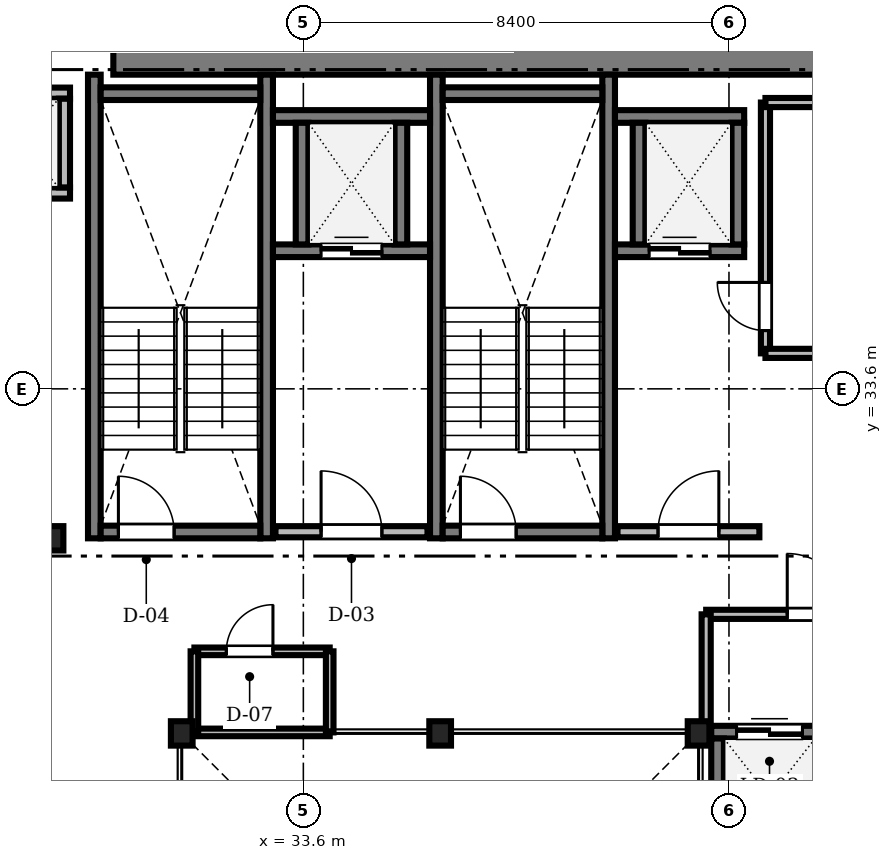
"""IFC4 building model, lengths in metres.
Left out: names, types, materials, properties, quantities, classifications, styles, units other than length and angle.
Written with IfcOpenShell. Run it as: python <this file> out.ifc"""

import sys

from ifc_helpers import new_model, si_unit, direction, frame, frame_2d, origin, origin_2d, place, context, subcontext, project, spatial, rectangle, i_section, extrude, source, transform, mapped, element, fill, save


model = new_model("IFC4")
c1 = context("Model", 3, precision=1e-05, world=origin(), true_north=direction((0.0, 1.0)))
c2 = subcontext(c1, "Body", "Model", "MODEL_VIEW")
j1 = project(units=[si_unit("LENGTHUNIT", "METRE"), si_unit("PLANEANGLEUNIT", "RADIAN")], contexts=[c1])
p1 = place(None, origin())
s1 = spatial("IfcSite", under=j1, at=p1, CompositionType="ELEMENT")
p2 = place(p1, origin())
s2 = spatial("IfcBuilding", under=s1, at=p2, CompositionType="ELEMENT")
p3 = place(p2, frame((0.0, 0.0, 75.05)))
s3 = spatial("IfcBuildingStorey", under=s2, at=p3, CompositionType="ELEMENT", Elevation=75.05)
m1 = source(origin(), c2, "Body", "SweptSolid", [
    extrude(rectangle(XDim=17.52, YDim=1.0, at=frame_2d((8.76, 0.0))), origin(), (0.0, 0.0, 1.0), 3.41),
])
p4 = place(p3, frame((29.85, 40.3, 0.0), z_axis=(0.0, 0.0, 1.0), x_axis=(1.0, 0.0, 0.0)))
e1 = element("IfcWall", 1, at=p4, inside=s3, PredefinedType="SHEAR", context=c2, shape_type="MappedRepresentation", body=[
    mapped(m1, transform((0.0, 0.0, 0.0), scale=1.0)),
])
m2 = source(origin(), c2, "Body", "SweptSolid", [
    extrude(i_section(OverallWidth=0.428, OverallDepth=0.481, WebThickness=0.04, FlangeThickness=0.063, FilletRadius=0.015, at=origin_2d()), origin(), (0.0, 0.0, 1.0), 3.41),
])
for number, where, z_axis, x_axis in (
    (2, (41.4, 26.8, 0.0), (0.0, 0.0, 1.0), (1.0, 0.0, 0.0)),
    (3, (36.3, 26.8, 0.0), (0.0, 0.0, 1.0), (1.0, 0.0, 0.0)),
    (4, (31.2, 26.8, 0.0), (0.0, 0.0, 1.0), (1.0, 0.0, 0.0)),
    (5, (28.65, 30.65, 0.0), (0.0, 0.0, 1.0), (1.0, 0.0, 0.0)),
):
    element("IfcColumn", number, at=place(p3, frame(where, z_axis=z_axis, x_axis=x_axis)), inside=s3, PredefinedType="COLUMN", context=c2, shape_type="MappedRepresentation", body=[
        mapped(m2, transform((0.0, 0.0, 0.0), scale=1.0)),
    ])
m3 = source(origin(), c2, "Body", "SweptSolid", [
    extrude(rectangle(XDim=9.15, YDim=0.25, at=frame_2d((4.575, 0.0))), origin(), (0.0, 0.0, 1.0), 3.45),
])
for number, where, z_axis, x_axis in (
    (6, (29.475, 30.65, 0.0), (0.0, 0.0, 1.0), (0.0, 1.0, 0.0)),
    (7, (32.875, 30.65, 0.0), (0.0, 0.0, 1.0), (0.0, 1.0, 0.0)),
):
    element("IfcWall", number, at=place(p3, frame(where, z_axis=z_axis, x_axis=x_axis)), inside=s3, PredefinedType="SOLIDWALL", context=c2, shape_type="MappedRepresentation", body=[
        mapped(m3, transform((0.0, 0.0, 0.0), scale=1.0)),
    ])
m4 = source(origin(), c2, "Body", "SweptSolid", [
    extrude(rectangle(XDim=3.15, YDim=0.25, at=frame_2d((1.575, 0.0))), origin(), (0.0, 0.0, 1.0), 3.45),
])
p5 = place(p3, frame((29.6, 39.425, 0.0), z_axis=(0.0, 0.0, 1.0), x_axis=(1.0, 0.0, 0.0)))
e8 = element("IfcWall", 8, at=p5, inside=s3, PredefinedType="SOLIDWALL", context=c2, shape_type="MappedRepresentation", body=[
    mapped(m4, transform((0.0, 0.0, 0.0), scale=1.0)),
])
p6 = place(p3, frame((29.6, 30.775, 0.0), z_axis=(0.0, 0.0, 1.0), x_axis=(1.0, 0.0, 0.0)))
e9 = element("IfcWall", 9, at=p6, inside=s3, PredefinedType="SOLIDWALL", context=c2, shape_type="MappedRepresentation", body=[
    mapped(m4, transform((0.0, 0.0, 0.0), scale=1.0)),
])
m5 = source(origin(), c2, "Body", "SweptSolid", [
    extrude(rectangle(XDim=1.1, YDim=2.2, at=frame_2d((0.55, 1.1))), frame((0.0, 0.135, 0.0), z_axis=(0.0, -1.0, 0.0), x_axis=(1.0, 0.0, 0.0)), (0.0, 0.0, 1.0), 0.27),
])
p7 = place(p6, frame((0.35, 0.0, 0.0)))
e10 = element("IfcOpeningElement", 10, at=p7, cuts=e9, PredefinedType="OPENING", context=c2, shape_type="MappedRepresentation", body=[
    mapped(m5, transform((0.0, 0.0, 0.0), scale=1.0)),
])
for number, where, z_axis, x_axis in (
    (11, (36.225, 30.65, 0.0), (0.0, 0.0, 1.0), (0.0, 1.0, 0.0)),
    (12, (39.625, 30.65, 0.0), (0.0, 0.0, 1.0), (0.0, 1.0, 0.0)),
):
    element("IfcWall", number, at=place(p3, frame(where, z_axis=z_axis, x_axis=x_axis)), inside=s3, PredefinedType="SOLIDWALL", context=c2, shape_type="MappedRepresentation", body=[
        mapped(m3, transform((0.0, 0.0, 0.0), scale=1.0)),
    ])
p8 = place(p3, frame((36.35, 39.425, 0.0), z_axis=(0.0, 0.0, 1.0), x_axis=(1.0, 0.0, 0.0)))
e13 = element("IfcWall", 13, at=p8, inside=s3, PredefinedType="SOLIDWALL", context=c2, shape_type="MappedRepresentation", body=[
    mapped(m4, transform((0.0, 0.0, 0.0), scale=1.0)),
])
p9 = place(p3, frame((36.35, 30.775, 0.0), z_axis=(0.0, 0.0, 1.0), x_axis=(1.0, 0.0, 0.0)))
e14 = element("IfcWall", 14, at=p9, inside=s3, PredefinedType="SOLIDWALL", context=c2, shape_type="MappedRepresentation", body=[
    mapped(m4, transform((0.0, 0.0, 0.0), scale=1.0)),
])
p10 = place(p9, frame((0.35, 0.0, 0.0)))
e15 = element("IfcOpeningElement", 15, at=p10, cuts=e14, PredefinedType="OPENING", context=c2, shape_type="MappedRepresentation", body=[
    mapped(m5, transform((0.0, 0.0, 0.0), scale=1.0)),
])
m6 = source(origin(), c2, "Body", "SweptSolid", [
    extrude(rectangle(XDim=3.0, YDim=0.22, at=frame_2d((1.5, 0.0))), origin(), (0.0, 0.0, 1.0), 3.41),
])
p11 = place(p3, frame((33.05, 30.78, 0.0), z_axis=(0.0, 0.0, 1.0), x_axis=(1.0, 0.0, 0.0)))
e16 = element("IfcWall", 16, at=p11, inside=s3, PredefinedType="SOLIDWALL", context=c2, shape_type="MappedRepresentation", body=[
    mapped(m6, transform((0.0, 0.0, 0.0), scale=1.0)),
])
m7 = source(origin(), c2, "Body", "SweptSolid", [
    extrude(rectangle(XDim=1.2, YDim=2.2, at=frame_2d((0.6, 1.1))), frame((0.0, 0.12, 0.0), z_axis=(0.0, -1.0, 0.0), x_axis=(1.0, 0.0, 0.0)), (0.0, 0.0, 1.0), 0.24),
])
p12 = place(p11, frame((0.9, 0.0, 0.0)))
e17 = element("IfcOpeningElement", 17, at=p12, cuts=e16, PredefinedType="OPENING", context=c2, shape_type="MappedRepresentation", body=[
    mapped(m7, transform((0.0, 0.0, 0.0), scale=1.0)),
])
m8 = source(origin(), c2, "Body", "SweptSolid", [
    extrude(rectangle(XDim=2.8, YDim=0.22, at=frame_2d((1.4, 0.0))), origin(), (0.0, 0.0, 1.0), 3.41),
])
p13 = place(p3, frame((39.8, 30.78, 0.0), z_axis=(0.0, 0.0, 1.0), x_axis=(1.0, 0.0, 0.0)))
e18 = element("IfcWall", 18, at=p13, inside=s3, PredefinedType="SOLIDWALL", context=c2, shape_type="MappedRepresentation", body=[
    mapped(m8, transform((0.0, 0.0, 0.0), scale=1.0)),
])
p14 = place(p13, frame((0.8, 0.0, 0.0)))
e19 = element("IfcOpeningElement", 19, at=p14, cuts=e18, PredefinedType="OPENING", context=c2, shape_type="MappedRepresentation", body=[
    mapped(m7, transform((0.0, 0.0, 0.0), scale=1.0)),
])
m9 = source(origin(), c2, "Body", "SweptSolid", [
    extrude(rectangle(XDim=1.99, YDim=0.22, at=frame_2d((0.995, 0.0))), origin(), (0.0, 0.0, 1.0), 3.41),
])
p15 = place(p3, frame((27.005, 37.465, 0.0), z_axis=(0.0, 0.0, 1.0), x_axis=(1.0, 0.0, 0.0)))
e20 = element("IfcWall", 20, at=p15, inside=s3, PredefinedType="SOLIDWALL", context=c2, shape_type="MappedRepresentation", body=[
    mapped(m9, transform((0.0, 0.0, 0.0), scale=1.0)),
])
m10 = source(origin(), c2, "Body", "SweptSolid", [
    extrude(rectangle(XDim=1.1, YDim=2.2, at=frame_2d((0.55, 1.1))), frame((0.0, 0.12, 0.0), z_axis=(0.0, -1.0, 0.0), x_axis=(1.0, 0.0, 0.0)), (0.0, 0.0, 1.0), 0.24),
])
p16 = place(p15, frame((0.445, 0.0, 0.0)))
e21 = element("IfcOpeningElement", 21, at=p16, cuts=e20, PredefinedType="OPENING", context=c2, shape_type="MappedRepresentation", body=[
    mapped(m10, transform((0.0, 0.0, 0.0), scale=1.0)),
])
p17 = place(p3, frame((27.005, 39.435, 0.0), z_axis=(0.0, 0.0, 1.0), x_axis=(1.0, 0.0, 0.0)))
e22 = element("IfcWall", 22, at=p17, inside=s3, PredefinedType="SOLIDWALL", context=c2, shape_type="MappedRepresentation", body=[
    mapped(m9, transform((0.0, 0.0, 0.0), scale=1.0)),
])
m11 = source(origin(), c2, "Body", "SweptSolid", [
    extrude(rectangle(XDim=1.75, YDim=0.22, at=frame_2d((0.875, 0.0))), origin(), (0.0, 0.0, 1.0), 3.41),
])
p18 = place(p3, frame((28.885, 37.575, 0.0), z_axis=(0.0, 0.0, 1.0), x_axis=(0.0, 1.0, 0.0)))
e23 = element("IfcWall", 23, at=p18, inside=s3, PredefinedType="SOLIDWALL", context=c2, shape_type="MappedRepresentation", body=[
    mapped(m11, transform((0.0, 0.0, 0.0), scale=1.0)),
])
m12 = source(origin(), c2, "Body", "SweptSolid", [
    extrude(rectangle(XDim=3.1, YDim=0.25, at=frame_2d((1.55, 0.0))), origin(), (0.0, 0.0, 1.0), 3.41),
])
p19 = place(p3, frame((33.0, 36.325, 0.0), z_axis=(0.0, 0.0, 1.0), x_axis=(1.0, 0.0, 0.0)))
e24 = element("IfcWall", 24, at=p19, inside=s3, PredefinedType="SOLIDWALL", context=c2, shape_type="MappedRepresentation", body=[
    mapped(m12, transform((0.0, 0.0, 0.0), scale=1.0)),
])
m13 = source(origin(), c2, "Body", "SweptSolid", [
    extrude(rectangle(XDim=1.2, YDim=2.25, at=frame_2d((0.6, 1.125))), frame((0.0, 0.135, 0.0), z_axis=(0.0, -1.0, 0.0), x_axis=(1.0, 0.0, 0.0)), (0.0, 0.0, 1.0), 0.27),
])
p20 = place(p19, frame((0.95, 0.0, 0.0)))
e25 = element("IfcOpeningElement", 25, at=p20, cuts=e24, PredefinedType="OPENING", context=c2, shape_type="MappedRepresentation", body=[
    mapped(m13, transform((0.0, 0.0, 0.0), scale=1.0)),
])
p21 = place(p3, frame((33.0, 38.975, 0.0), z_axis=(0.0, 0.0, 1.0), x_axis=(1.0, 0.0, 0.0)))
e26 = element("IfcWall", 26, at=p21, inside=s3, PredefinedType="SOLIDWALL", context=c2, shape_type="MappedRepresentation", body=[
    mapped(m12, transform((0.0, 0.0, 0.0), scale=1.0)),
])
m14 = source(origin(), c2, "Body", "SweptSolid", [
    extrude(rectangle(XDim=2.4, YDim=0.25, at=frame_2d((1.2, 0.0))), origin(), (0.0, 0.0, 1.0), 3.41),
])
for number, where, z_axis, x_axis in (
    (27, (33.575, 36.45, 0.0), (0.0, 0.0, 1.0), (0.0, 1.0, 0.0)),
    (28, (35.525, 36.45, 0.0), (0.0, 0.0, 1.0), (0.0, 1.0, 0.0)),
):
    element("IfcWall", number, at=place(p3, frame(where, z_axis=z_axis, x_axis=x_axis)), inside=s3, PredefinedType="SOLIDWALL", context=c2, shape_type="MappedRepresentation", body=[
        mapped(m14, transform((0.0, 0.0, 0.0), scale=1.0)),
    ])
m15 = source(origin(), c2, "Body", "SweptSolid", [
    extrude(rectangle(XDim=2.55, YDim=0.25, at=frame_2d((1.275, 0.0))), origin(), (0.0, 0.0, 1.0), 3.41),
])
p22 = place(p3, frame((39.75, 36.325, 0.0), z_axis=(0.0, 0.0, 1.0), x_axis=(1.0, 0.0, 0.0)))
e29 = element("IfcWall", 29, at=p22, inside=s3, PredefinedType="SOLIDWALL", context=c2, shape_type="MappedRepresentation", body=[
    mapped(m15, transform((0.0, 0.0, 0.0), scale=1.0)),
])
p23 = place(p22, frame((0.675, 0.0, 0.0)))
e30 = element("IfcOpeningElement", 30, at=p23, cuts=e29, PredefinedType="OPENING", context=c2, shape_type="MappedRepresentation", body=[
    mapped(m13, transform((0.0, 0.0, 0.0), scale=1.0)),
])
p24 = place(p3, frame((39.75, 38.975, 0.0), z_axis=(0.0, 0.0, 1.0), x_axis=(1.0, 0.0, 0.0)))
e31 = element("IfcWall", 31, at=p24, inside=s3, PredefinedType="SOLIDWALL", context=c2, shape_type="MappedRepresentation", body=[
    mapped(m15, transform((0.0, 0.0, 0.0), scale=1.0)),
])
for number, where, z_axis, x_axis in (
    (32, (40.225, 36.45, 0.0), (0.0, 0.0, 1.0), (0.0, 1.0, 0.0)),
    (33, (42.175, 36.45, 0.0), (0.0, 0.0, 1.0), (0.0, 1.0, 0.0)),
):
    element("IfcWall", number, at=place(p3, frame(where, z_axis=z_axis, x_axis=x_axis)), inside=s3, PredefinedType="SOLIDWALL", context=c2, shape_type="MappedRepresentation", body=[
        mapped(m14, transform((0.0, 0.0, 0.0), scale=1.0)),
    ])
m16 = source(origin(), c2, "Body", "SweptSolid", [
    extrude(rectangle(XDim=2.3, YDim=0.25, at=frame_2d((1.15, 0.0))), origin(), (0.0, 0.0, 1.0), 3.41),
])
p25 = place(p3, frame((41.65, 26.825, 0.0), z_axis=(0.0, 0.0, 1.0), x_axis=(1.0, 0.0, 0.0)))
e34 = element("IfcWall", 34, at=p25, inside=s3, PredefinedType="SOLIDWALL", context=c2, shape_type="MappedRepresentation", body=[
    mapped(m16, transform((0.0, 0.0, 0.0), scale=1.0)),
])
m17 = source(origin(), c2, "Body", "SweptSolid", [
    extrude(rectangle(XDim=1.3, YDim=2.3, at=frame_2d((0.65, 1.15))), frame((0.0, 0.135, 0.0), z_axis=(0.0, -1.0, 0.0), x_axis=(1.0, 0.0, 0.0)), (0.0, 0.0, 1.0), 0.27),
])
p26 = place(p25, frame((0.5, 0.0, 0.0)))
e35 = element("IfcOpeningElement", 35, at=p26, cuts=e34, PredefinedType="OPENING", context=c2, shape_type="MappedRepresentation", body=[
    mapped(m17, transform((0.0, 0.0, 0.0), scale=1.0)),
])
p27 = place(p3, frame((41.775, 24.4, 0.0), z_axis=(0.0, 0.0, 1.0), x_axis=(0.0, 1.0, 0.0)))
e36 = element("IfcWall", 36, at=p27, inside=s3, PredefinedType="SOLIDWALL", context=c2, shape_type="MappedRepresentation", body=[
    mapped(m16, transform((0.0, 0.0, 0.0), scale=1.0)),
])
m18 = source(origin(), c2, "Body", "SweptSolid", [
    extrude(rectangle(XDim=4.95, YDim=0.18, at=frame_2d((2.475, 0.0))), origin(), (0.0, 0.0, 1.0), 3.41),
])
p28 = place(p3, frame((42.72, 34.3, 0.0), z_axis=(0.0, 0.0, 1.0), x_axis=(0.0, 1.0, 0.0)))
e37 = element("IfcWall", 37, at=p28, inside=s3, PredefinedType="PARTITIONING", context=c2, shape_type="MappedRepresentation", body=[
    mapped(m18, transform((0.0, 0.0, 0.0), scale=1.0)),
])
m19 = source(origin(), c2, "Body", "SweptSolid", [
    extrude(rectangle(XDim=0.95, YDim=2.15, at=frame_2d((0.475, 1.075))), frame((0.0, 0.1, 0.0), z_axis=(0.0, -1.0, 0.0), x_axis=(1.0, 0.0, 0.0)), (0.0, 0.0, 1.0), 0.2),
])
p29 = place(p28, frame((0.45, 0.0, 0.0)))
e38 = element("IfcOpeningElement", 38, at=p29, cuts=e37, PredefinedType="OPENING", context=c2, shape_type="MappedRepresentation", body=[
    mapped(m19, transform((0.0, 0.0, 0.0), scale=1.0)),
])
m20 = source(origin(), c2, "Body", "SweptSolid", [
    extrude(rectangle(XDim=4.448, YDim=0.18, at=frame_2d((2.224, 0.0))), origin(), (0.0, 0.0, 1.0), 3.042),
])
p30 = place(p3, frame((41.55, 29.15, 0.0), z_axis=(0.0, 0.0, 1.0), x_axis=(1.0, 0.0, 0.0)))
e39 = element("IfcWall", 39, at=p30, inside=s3, PredefinedType="PARTITIONING", context=c2, shape_type="MappedRepresentation", body=[
    mapped(m20, transform((0.0, 0.0, 0.0), scale=1.0)),
])
m21 = source(origin(), c2, "Body", "SweptSolid", [
    extrude(rectangle(XDim=1.2, YDim=2.2, at=frame_2d((0.6, 1.1))), frame((0.0, 0.1, 0.0), z_axis=(0.0, -1.0, 0.0), x_axis=(1.0, 0.0, 0.0)), (0.0, 0.0, 1.0), 0.2),
])
p31 = place(p30, frame((1.6, 0.0, 0.0)))
e40 = element("IfcOpeningElement", 40, at=p31, cuts=e39, PredefinedType="OPENING", context=c2, shape_type="MappedRepresentation", body=[
    mapped(m21, transform((0.0, 0.0, 0.0), scale=1.0)),
])
m22 = source(origin(), c2, "Body", "SweptSolid", [
    extrude(rectangle(XDim=2.67, YDim=0.15, at=frame_2d((1.335, 0.0))), origin(), (0.0, 0.0, 1.0), 3.042),
])
p32 = place(p3, frame((31.45, 28.42, 0.0), z_axis=(0.0, 0.0, 1.0), x_axis=(1.0, 0.0, 0.0)))
e41 = element("IfcWall", 41, at=p32, inside=s3, PredefinedType="PARTITIONING", context=c2, shape_type="MappedRepresentation", body=[
    mapped(m22, transform((0.0, 0.0, 0.0), scale=1.0)),
])
m23 = source(origin(), c2, "Body", "SweptSolid", [
    extrude(rectangle(XDim=0.92, YDim=2.1, at=frame_2d((0.46, 1.05))), frame((0.0, 0.085, 0.0), z_axis=(0.0, -1.0, 0.0), x_axis=(1.0, 0.0, 0.0)), (0.0, 0.0, 1.0), 0.17),
])
p33 = place(p32, frame((0.63, 0.0, 0.0)))
e42 = element("IfcOpeningElement", 42, at=p33, cuts=e41, PredefinedType="OPENING", context=c2, shape_type="MappedRepresentation", body=[
    mapped(m23, transform((0.0, 0.0, 0.0), scale=1.0)),
])
m24 = source(origin(), c2, "Body", "SweptSolid", [
    extrude(rectangle(XDim=2.67, YDim=0.15, at=frame_2d((1.335, 0.0))), origin(), (0.0, 0.0, 1.0), 2.952),
])
p34 = place(p3, frame((31.45, 26.82, 0.0), z_axis=(0.0, 0.0, 1.0), x_axis=(1.0, 0.0, 0.0)))
e43 = element("IfcWall", 43, at=p34, inside=s3, PredefinedType="PARTITIONING", context=c2, shape_type="MappedRepresentation", body=[
    mapped(m24, transform((0.0, 0.0, 0.0), scale=1.0)),
])
m25 = source(origin(), c2, "Body", "SweptSolid", [
    extrude(rectangle(XDim=2.35, YDim=0.18, at=frame_2d((1.175, 0.0))), origin(), (0.0, 0.0, 1.0), 2.802),
])
p35 = place(p3, frame((41.55, 26.8, 0.0), z_axis=(0.0, 0.0, 1.0), x_axis=(0.0, 1.0, 0.0)))
e44 = element("IfcWall", 44, at=p35, inside=s3, PredefinedType="PARTITIONING", context=c2, shape_type="MappedRepresentation", body=[
    mapped(m25, transform((0.0, 0.0, 0.0), scale=1.0)),
])
m26 = source(origin(), c2, "Body", "SweptSolid", [
    extrude(rectangle(XDim=1.6, YDim=0.15, at=frame_2d((0.8, 0.0))), origin(), (0.0, 0.0, 1.0), 2.952),
])
for number, where, z_axis, x_axis in (
    (45, (31.45, 26.82, 0.0), (0.0, 0.0, 1.0), (0.0, 1.0, 0.0)),
    (46, (34.12, 26.82, 0.0), (0.0, 0.0, 1.0), (0.0, 1.0, 0.0)),
):
    element("IfcWall", number, at=place(p3, frame(where, z_axis=z_axis, x_axis=x_axis)), inside=s3, PredefinedType="PARTITIONING", context=c2, shape_type="MappedRepresentation", body=[
        mapped(m26, transform((0.0, 0.0, 0.0), scale=1.0)),
    ])
m27 = source(origin(), c2, "Body", "SweptSolid", [
    extrude(rectangle(XDim=1.128, YDim=0.18, at=frame_2d((0.564, 0.0))), origin(), (0.0, 0.0, 1.0), 3.41),
])
for number, where, z_axis, x_axis in (
    (47, (42.72, 34.3, 0.0), (0.0, 0.0, 1.0), (1.0, 0.0, 0.0)),
    (48, (42.72, 39.25, 0.0), (0.0, 0.0, 1.0), (1.0, 0.0, 0.0)),
):
    element("IfcWall", number, at=place(p3, frame(where, z_axis=z_axis, x_axis=x_axis)), inside=s3, PredefinedType="PARTITIONING", context=c2, shape_type="MappedRepresentation", body=[
        mapped(m27, transform((0.0, 0.0, 0.0), scale=1.0)),
    ])
m28 = source(origin(), c2, "Body", "SweptSolid", [
    extrude(rectangle(XDim=1.1, YDim=2.2, at=frame_2d((0.55, 1.1))), frame((0.0, 0.025, 0.0), z_axis=(0.0, -1.0, 0.0), x_axis=(1.0, 0.0, 0.0)), (0.0, 0.0, 1.0), 0.05),
])
p36 = place(p7, origin())
e49 = element("IfcDoor", 49, at=p36, inside=s3, OperationType="SINGLE_SWING_LEFT", PredefinedType="DOOR", context=c2, shape_type="MappedRepresentation", body=[
    mapped(m28, transform((0.0, 0.0, 0.0), scale=1.0)),
])
fill(e10, e49)
p37 = place(p10, origin())
e50 = element("IfcDoor", 50, at=p37, inside=s3, OperationType="SINGLE_SWING_LEFT", PredefinedType="DOOR", context=c2, shape_type="MappedRepresentation", body=[
    mapped(m28, transform((0.0, 0.0, 0.0), scale=1.0)),
])
fill(e15, e50)
m29 = source(origin(), c2, "Body", "SweptSolid", [
    extrude(rectangle(XDim=1.2, YDim=2.2, at=frame_2d((0.6, 1.1))), frame((0.0, 0.025, 0.0), z_axis=(0.0, -1.0, 0.0), x_axis=(1.0, 0.0, 0.0)), (0.0, 0.0, 1.0), 0.05),
])
p38 = place(p12, origin())
e51 = element("IfcDoor", 51, at=p38, inside=s3, OperationType="SINGLE_SWING_LEFT", PredefinedType="DOOR", context=c2, shape_type="MappedRepresentation", body=[
    mapped(m29, transform((0.0, 0.0, 0.0), scale=1.0)),
])
fill(e17, e51)
p39 = place(p14, origin())
e52 = element("IfcDoor", 52, at=p39, inside=s3, OperationType="SINGLE_SWING_RIGHT", PredefinedType="DOOR", context=c2, shape_type="MappedRepresentation", body=[
    mapped(m29, transform((0.0, 0.0, 0.0), scale=1.0)),
])
fill(e19, e52)
m30 = source(origin(), c2, "Body", "SweptSolid", [
    extrude(rectangle(XDim=1.2, YDim=2.25, at=frame_2d((0.6, 1.125))), frame((0.0, 0.025, 0.0), z_axis=(0.0, -1.0, 0.0), x_axis=(1.0, 0.0, 0.0)), (0.0, 0.0, 1.0), 0.05),
])
p40 = place(p20, origin())
e53 = element("IfcDoor", 53, at=p40, inside=s3, OperationType="DOUBLE_DOOR_SLIDING", PredefinedType="DOOR", context=c2, shape_type="MappedRepresentation", body=[
    mapped(m30, transform((0.0, 0.0, 0.0), scale=1.0)),
])
fill(e25, e53)
p41 = place(p23, origin())
e54 = element("IfcDoor", 54, at=p41, inside=s3, OperationType="DOUBLE_DOOR_SLIDING", PredefinedType="DOOR", context=c2, shape_type="MappedRepresentation", body=[
    mapped(m30, transform((0.0, 0.0, 0.0), scale=1.0)),
])
fill(e30, e54)
m31 = source(origin(), c2, "Body", "SweptSolid", [
    extrude(rectangle(XDim=1.3, YDim=2.3, at=frame_2d((0.65, 1.15))), frame((0.0, 0.025, 0.0), z_axis=(0.0, -1.0, 0.0), x_axis=(1.0, 0.0, 0.0)), (0.0, 0.0, 1.0), 0.05),
])
p42 = place(p26, origin())
e55 = element("IfcDoor", 55, at=p42, inside=s3, OperationType="DOUBLE_DOOR_SLIDING", PredefinedType="DOOR", context=c2, shape_type="MappedRepresentation", body=[
    mapped(m31, transform((0.0, 0.0, 0.0), scale=1.0)),
])
fill(e35, e55)
m32 = source(origin(), c2, "Body", "SweptSolid", [
    extrude(rectangle(XDim=0.95, YDim=2.15, at=frame_2d((0.475, 1.075))), frame((0.0, 0.025, 0.0), z_axis=(0.0, -1.0, 0.0), x_axis=(1.0, 0.0, 0.0)), (0.0, 0.0, 1.0), 0.05),
])
p43 = place(p29, origin())
e56 = element("IfcDoor", 56, at=p43, inside=s3, OperationType="SINGLE_SWING_RIGHT", PredefinedType="DOOR", context=c2, shape_type="MappedRepresentation", body=[
    mapped(m32, transform((0.0, 0.0, 0.0), scale=1.0)),
])
fill(e38, e56)
p44 = place(p31, origin())
e57 = element("IfcDoor", 57, at=p44, inside=s3, OperationType="SINGLE_SWING_LEFT", PredefinedType="DOOR", context=c2, shape_type="MappedRepresentation", body=[
    mapped(m29, transform((0.0, 0.0, 0.0), scale=1.0)),
])
fill(e40, e57)
m33 = source(origin(), c2, "Body", "SweptSolid", [
    extrude(rectangle(XDim=0.92, YDim=2.1, at=frame_2d((0.46, 1.05))), frame((0.0, 0.025, 0.0), z_axis=(0.0, -1.0, 0.0), x_axis=(1.0, 0.0, 0.0)), (0.0, 0.0, 1.0), 0.05),
])
p45 = place(p33, origin())
e58 = element("IfcDoor", 58, at=p45, inside=s3, OperationType="SINGLE_SWING_RIGHT", PredefinedType="DOOR", context=c2, shape_type="MappedRepresentation", body=[
    mapped(m33, transform((0.0, 0.0, 0.0), scale=1.0)),
])
fill(e42, e58)
save(model, sys.argv[1])
